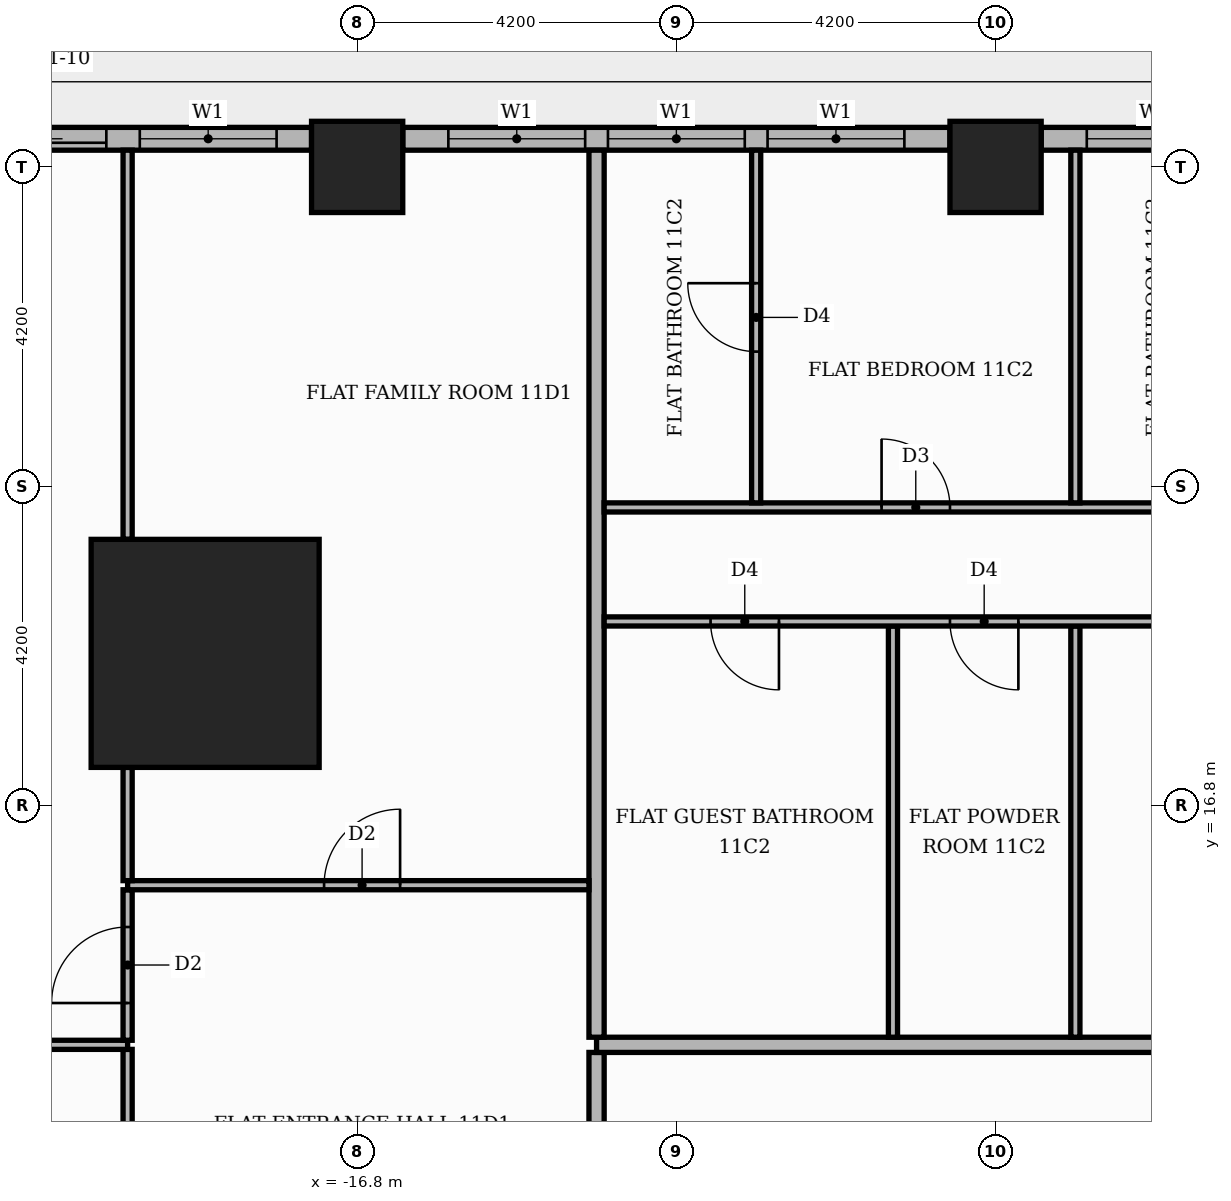
"""IFC4 building model, lengths in metres.
Left out: names, types, materials, properties, quantities, classifications, styles, units other than length and angle.
Written with IfcOpenShell. Run it as: python <this file> out.ifc"""

import sys

from ifc_helpers import new_model, si_unit, direction, frame, frame_2d, origin, origin_2d, place, context, subcontext, project, spatial, rectangle, extrude, element, fill, save


model = new_model("IFC4")
c1 = context("Model", 3, precision=1e-05, world=origin(), true_north=direction((0.0, 1.0)))
c2 = subcontext(c1, "Body", "Model", "MODEL_VIEW")
j1 = project(units=[si_unit("LENGTHUNIT", "METRE"), si_unit("PLANEANGLEUNIT", "RADIAN")], contexts=[c1])
p1 = place(None, origin())
s1 = spatial("IfcSite", under=j1, at=p1, CompositionType="ELEMENT")
p2 = place(p1, origin())
s2 = spatial("IfcBuilding", under=s1, at=p2, CompositionType="ELEMENT")
p3 = place(p2, frame((0.0, 0.0, 50.4)))
s3 = spatial("IfcBuildingStorey", under=s2, at=p3, CompositionType="ELEMENT", Elevation=50.4)
p4 = place(p3, frame((-18.8, 18.8, 0.0), z_axis=(0.0, 0.0, 1.0), x_axis=(1.0, 0.0, 0.0)))
e1 = element("IfcColumn", 1, at=p4, inside=s3, PredefinedType="COLUMN", context=c2, shape_type="SweptSolid", body=[
    extrude(rectangle(XDim=3.0, YDim=3.0, at=origin_2d()), origin(), (0.0, 0.0, 1.0), 3.9),
])
for number, where, z_axis, x_axis in (
    (2, (-8.4, 25.2, 0.0), (0.0, 0.0, 1.0), (1.0, 0.0, 0.0)),
    (3, (-16.8, 25.2, 0.0), (0.0, 0.0, 1.0), (1.0, 0.0, 0.0)),
):
    element("IfcColumn", number, at=place(p3, frame(where, z_axis=z_axis, x_axis=x_axis)), inside=s3, PredefinedType="COLUMN", context=c2, shape_type="SweptSolid", body=[
        extrude(rectangle(XDim=1.2, YDim=1.2, at=origin_2d()), origin(), (0.0, 0.0, 1.0), 3.9),
    ])
p5 = place(p3, frame((-0.6, 25.57, 0.0), z_axis=(0.0, 0.0, 1.0), x_axis=(-1.0, 0.0, 0.0)))
e4 = element("IfcWall", 4, at=p5, inside=s3, PredefinedType="STANDARD", context=c2, shape_type="SweptSolid", body=[
    extrude(rectangle(XDim=7.2, YDim=0.3, at=frame_2d((3.6, 0.0))), origin(), (0.0, 0.0, 1.0), 3.48),
])
p6 = place(p5, frame((0.6, 0.0, 0.0)))
e5 = element("IfcOpeningElement", 5, at=p6, cuts=e4, PredefinedType="OPENING", context=c2, shape_type="SweptSolid", body=[
    extrude(rectangle(XDim=1.8, YDim=2.4, at=frame_2d((0.9, 1.2))), frame((0.0, 0.16, 0.0), z_axis=(0.0, -1.0, 0.0), x_axis=(1.0, 0.0, 0.0)), (0.0, 0.0, 1.0), 0.32),
])
p7 = place(p5, frame((2.7, 0.0, 0.9)))
e6 = element("IfcOpeningElement", 6, at=p7, cuts=e4, PredefinedType="OPENING", context=c2, shape_type="SweptSolid", body=[
    extrude(rectangle(XDim=1.8, YDim=2.1, at=frame_2d((0.9, 1.05))), frame((0.0, 0.16, 0.0), z_axis=(0.0, -1.0, 0.0), x_axis=(1.0, 0.0, 0.0)), (0.0, 0.0, 1.0), 0.32),
])
p8 = place(p5, frame((4.8, 0.0, 0.9)))
e7 = element("IfcOpeningElement", 7, at=p8, cuts=e4, PredefinedType="OPENING", context=c2, shape_type="SweptSolid", body=[
    extrude(rectangle(XDim=1.8, YDim=2.1, at=frame_2d((0.9, 1.05))), frame((0.0, 0.16, 0.0), z_axis=(0.0, -1.0, 0.0), x_axis=(1.0, 0.0, 0.0)), (0.0, 0.0, 1.0), 0.32),
])
p9 = place(p3, frame((-9.0, 25.57, 0.0), z_axis=(0.0, 0.0, 1.0), x_axis=(-1.0, 0.0, 0.0)))
e8 = element("IfcWall", 8, at=p9, inside=s3, PredefinedType="STANDARD", context=c2, shape_type="SweptSolid", body=[
    extrude(rectangle(XDim=7.2, YDim=0.3, at=frame_2d((3.6, 0.0))), origin(), (0.0, 0.0, 1.0), 3.48),
])
p10 = place(p9, frame((0.6, 0.0, 0.9)))
e9 = element("IfcOpeningElement", 9, at=p10, cuts=e8, PredefinedType="OPENING", context=c2, shape_type="SweptSolid", body=[
    extrude(rectangle(XDim=1.8, YDim=2.1, at=frame_2d((0.9, 1.05))), frame((0.0, 0.16, 0.0), z_axis=(0.0, -1.0, 0.0), x_axis=(1.0, 0.0, 0.0)), (0.0, 0.0, 1.0), 0.32),
])
p11 = place(p9, frame((2.7, 0.0, 0.9)))
e10 = element("IfcOpeningElement", 10, at=p11, cuts=e8, PredefinedType="OPENING", context=c2, shape_type="SweptSolid", body=[
    extrude(rectangle(XDim=1.8, YDim=2.1, at=frame_2d((0.9, 1.05))), frame((0.0, 0.16, 0.0), z_axis=(0.0, -1.0, 0.0), x_axis=(1.0, 0.0, 0.0)), (0.0, 0.0, 1.0), 0.32),
])
p12 = place(p9, frame((4.8, 0.0, 0.9)))
e11 = element("IfcOpeningElement", 11, at=p12, cuts=e8, PredefinedType="OPENING", context=c2, shape_type="SweptSolid", body=[
    extrude(rectangle(XDim=1.8, YDim=2.1, at=frame_2d((0.9, 1.05))), frame((0.0, 0.16, 0.0), z_axis=(0.0, -1.0, 0.0), x_axis=(1.0, 0.0, 0.0)), (0.0, 0.0, 1.0), 0.32),
])
p13 = place(p3, frame((-17.4, 25.57, 0.0), z_axis=(0.0, 0.0, 1.0), x_axis=(-1.0, 0.0, 0.0)))
e12 = element("IfcWall", 12, at=p13, inside=s3, PredefinedType="STANDARD", context=c2, shape_type="SweptSolid", body=[
    extrude(rectangle(XDim=5.32, YDim=0.3, at=frame_2d((2.66, 0.0))), origin(), (0.0, 0.0, 1.0), 3.48),
])
p14 = place(p13, frame((2.7, 0.0, 0.0)))
e13 = element("IfcOpeningElement", 13, at=p14, cuts=e12, PredefinedType="OPENING", context=c2, shape_type="SweptSolid", body=[
    extrude(rectangle(XDim=1.8, YDim=2.4, at=frame_2d((0.9, 1.2))), frame((0.0, 0.16, 0.0), z_axis=(0.0, -1.0, 0.0), x_axis=(1.0, 0.0, 0.0)), (0.0, 0.0, 1.0), 0.32),
])
p15 = place(p13, frame((0.46, 0.0, 0.9)))
e14 = element("IfcOpeningElement", 14, at=p15, cuts=e12, PredefinedType="OPENING", context=c2, shape_type="SweptSolid", body=[
    extrude(rectangle(XDim=1.8, YDim=2.1, at=frame_2d((0.9, 1.05))), frame((0.0, 0.16, 0.0), z_axis=(0.0, -1.0, 0.0), x_axis=(1.0, 0.0, 0.0)), (0.0, 0.0, 1.0), 0.32),
])
p16 = place(p3, frame((-13.65, 5.35, 0.0), z_axis=(0.0, 0.0, 1.0), x_axis=(0.0, 1.0, 0.0)))
e15 = element("IfcWall", 15, at=p16, inside=s3, PredefinedType="PARTITIONING", context=c2, shape_type="SweptSolid", body=[
    extrude(rectangle(XDim=8.2, YDim=0.2, at=frame_2d((4.1, 0.0))), origin(), (0.0, 0.0, 1.0), 3.48),
])
p17 = place(p16, frame((5.65, 0.0, 0.0)))
e16 = element("IfcOpeningElement", 16, at=p17, cuts=e15, PredefinedType="OPENING", context=c2, shape_type="SweptSolid", body=[
    extrude(rectangle(XDim=1.1, YDim=2.4, at=frame_2d((0.55, 1.2))), frame((0.0, 0.11, 0.0), z_axis=(0.0, -1.0, 0.0), x_axis=(1.0, 0.0, 0.0)), (0.0, 0.0, 1.0), 0.22),
])
p18 = place(p3, frame((-19.82, 9.51, 0.0), z_axis=(0.0, 0.0, 1.0), x_axis=(0.0, 1.0, 0.0)))
e17 = element("IfcWall", 17, at=p18, inside=s3, PredefinedType="PARTITIONING", context=c2, shape_type="SweptSolid", body=[
    extrude(rectangle(XDim=4.08, YDim=0.12, at=frame_2d((2.04, 0.0))), origin(), (0.0, 0.0, 1.0), 3.48),
])
p19 = place(p18, frame((1.59, 0.0, 0.0)))
e18 = element("IfcOpeningElement", 18, at=p19, cuts=e17, PredefinedType="OPENING", context=c2, shape_type="SweptSolid", body=[
    extrude(rectangle(XDim=0.9, YDim=2.1, at=frame_2d((0.45, 1.05))), frame((0.0, 0.07, 0.0), z_axis=(0.0, -1.0, 0.0), x_axis=(1.0, 0.0, 0.0)), (0.0, 0.0, 1.0), 0.14),
])
p20 = place(p3, frame((-25.42, 13.65, 0.0), z_axis=(0.0, 0.0, 1.0), x_axis=(1.0, 0.0, 0.0)))
e19 = element("IfcWall", 19, at=p20, inside=s3, PredefinedType="PARTITIONING", context=c2, shape_type="SweptSolid", body=[
    extrude(rectangle(XDim=5.6, YDim=0.12, at=frame_2d((2.8, 0.0))), origin(), (0.0, 0.0, 1.0), 3.48),
])
p21 = place(p3, frame((-13.65, 13.65, 0.0), z_axis=(0.0, 0.0, 1.0), x_axis=(1.0, 0.0, 0.0)))
e20 = element("IfcWall", 20, at=p21, inside=s3, PredefinedType="PARTITIONING", context=c2, shape_type="SweptSolid", body=[
    extrude(rectangle(XDim=39.07, YDim=0.2, at=frame_2d((19.535, 0.0))), origin(), (0.0, 0.0, 1.0), 3.48),
])
p22 = place(p21, frame((24.65, 0.0, 0.0)))
e21 = element("IfcOpeningElement", 21, at=p22, cuts=e20, PredefinedType="OPENING", context=c2, shape_type="SweptSolid", body=[
    extrude(rectangle(XDim=1.1, YDim=2.4, at=frame_2d((0.55, 1.2))), frame((0.0, 0.11, 0.0), z_axis=(0.0, -1.0, 0.0), x_axis=(1.0, 0.0, 0.0)), (0.0, 0.0, 1.0), 0.22),
])
p23 = place(p21, frame((14.15, 0.0, 0.0)))
e22 = element("IfcOpeningElement", 22, at=p23, cuts=e20, PredefinedType="OPENING", context=c2, shape_type="SweptSolid", body=[
    extrude(rectangle(XDim=1.1, YDim=2.4, at=frame_2d((0.55, 1.2))), frame((0.0, 0.11, 0.0), z_axis=(0.0, -1.0, 0.0), x_axis=(1.0, 0.0, 0.0)), (0.0, 0.0, 1.0), 0.22),
])
p24 = place(p3, frame((-19.82, 13.71, 0.0), z_axis=(0.0, 0.0, 1.0), x_axis=(0.0, 1.0, 0.0)))
e23 = element("IfcWall", 23, at=p24, inside=s3, PredefinedType="PARTITIONING", context=c2, shape_type="SweptSolid", body=[
    extrude(rectangle(XDim=1.98, YDim=0.12, at=frame_2d((0.99, 0.0))), origin(), (0.0, 0.0, 1.0), 3.48),
])
p25 = place(p24, frame((0.49, 0.0, 0.0)))
e24 = element("IfcOpeningElement", 24, at=p25, cuts=e23, PredefinedType="OPENING", context=c2, shape_type="SweptSolid", body=[
    extrude(rectangle(XDim=1.0, YDim=2.1, at=frame_2d((0.5, 1.05))), frame((0.0, 0.07, 0.0), z_axis=(0.0, -1.0, 0.0), x_axis=(1.0, 0.0, 0.0)), (0.0, 0.0, 1.0), 0.14),
])
p26 = place(p3, frame((-13.65, 13.75, 0.0), z_axis=(0.0, 0.0, 1.0), x_axis=(0.0, 1.0, 0.0)))
e25 = element("IfcWall", 25, at=p26, inside=s3, PredefinedType="PARTITIONING", context=c2, shape_type="SweptSolid", body=[
    extrude(rectangle(XDim=11.67, YDim=0.2, at=frame_2d((5.835, 0.0))), origin(), (0.0, 0.0, 1.0), 3.48),
])
for number, where, z_axis, x_axis in (
    (26, (-9.75, 13.75, 0.0), (0.0, 0.0, 1.0), (0.0, 1.0, 0.0)),
    (27, (-7.35, 13.75, 0.0), (0.0, 0.0, 1.0), (0.0, 1.0, 0.0)),
):
    element("IfcWall", number, at=place(p3, frame(where, z_axis=z_axis, x_axis=x_axis)), inside=s3, PredefinedType="PARTITIONING", context=c2, shape_type="SweptSolid", body=[
        extrude(rectangle(XDim=5.41, YDim=0.12, at=frame_2d((2.705, 0.0))), origin(), (0.0, 0.0, 1.0), 3.48),
    ])
p27 = place(p3, frame((-19.82, 15.75, 0.0), z_axis=(0.0, 0.0, 1.0), x_axis=(1.0, 0.0, 0.0)))
e28 = element("IfcWall", 28, at=p27, inside=s3, PredefinedType="PARTITIONING", context=c2, shape_type="SweptSolid", body=[
    extrude(rectangle(XDim=6.07, YDim=0.12, at=frame_2d((3.035, 0.0))), origin(), (0.0, 0.0, 1.0), 3.48),
])
p28 = place(p27, frame((2.585, 0.0, 0.0)))
e29 = element("IfcOpeningElement", 29, at=p28, cuts=e28, PredefinedType="OPENING", context=c2, shape_type="SweptSolid", body=[
    extrude(rectangle(XDim=1.0, YDim=2.1, at=frame_2d((0.5, 1.05))), frame((0.0, 0.07, 0.0), z_axis=(0.0, -1.0, 0.0), x_axis=(1.0, 0.0, 0.0)), (0.0, 0.0, 1.0), 0.14),
])
p29 = place(p3, frame((-19.82, 15.81, 0.0), z_axis=(0.0, 0.0, 1.0), x_axis=(0.0, 1.0, 0.0)))
e30 = element("IfcWall", 30, at=p29, inside=s3, PredefinedType="PARTITIONING", context=c2, shape_type="SweptSolid", body=[
    extrude(rectangle(XDim=1.49, YDim=0.12, at=frame_2d((0.745, 0.0))), origin(), (0.0, 0.0, 1.0), 3.48),
])
p30 = place(p3, frame((-13.55, 19.22, 0.0), z_axis=(0.0, 0.0, 1.0), x_axis=(1.0, 0.0, 0.0)))
e31 = element("IfcWall", 31, at=p30, inside=s3, PredefinedType="PARTITIONING", context=c2, shape_type="SweptSolid", body=[
    extrude(rectangle(XDim=12.5, YDim=0.12, at=frame_2d((6.25, 0.0))), origin(), (0.0, 0.0, 1.0), 3.48),
])
p31 = place(p30, frame((8.9, 0.0, 0.0)))
e32 = element("IfcOpeningElement", 32, at=p31, cuts=e31, PredefinedType="OPENING", context=c2, shape_type="SweptSolid", body=[
    extrude(rectangle(XDim=0.9, YDim=2.1, at=frame_2d((0.45, 1.05))), frame((0.0, 0.07, 0.0), z_axis=(0.0, -1.0, 0.0), x_axis=(1.0, 0.0, 0.0)), (0.0, 0.0, 1.0), 0.14),
])
p32 = place(p30, frame((4.55, 0.0, 0.0)))
e33 = element("IfcOpeningElement", 33, at=p32, cuts=e31, PredefinedType="OPENING", context=c2, shape_type="SweptSolid", body=[
    extrude(rectangle(XDim=0.9, YDim=2.1, at=frame_2d((0.45, 1.05))), frame((0.0, 0.07, 0.0), z_axis=(0.0, -1.0, 0.0), x_axis=(1.0, 0.0, 0.0)), (0.0, 0.0, 1.0), 0.14),
])
p33 = place(p30, frame((1.4, 0.0, 0.0)))
e34 = element("IfcOpeningElement", 34, at=p33, cuts=e31, PredefinedType="OPENING", context=c2, shape_type="SweptSolid", body=[
    extrude(rectangle(XDim=0.9, YDim=2.1, at=frame_2d((0.45, 1.05))), frame((0.0, 0.07, 0.0), z_axis=(0.0, -1.0, 0.0), x_axis=(1.0, 0.0, 0.0)), (0.0, 0.0, 1.0), 0.14),
])
p34 = place(p3, frame((-19.82, 20.3, 0.0), z_axis=(0.0, 0.0, 1.0), x_axis=(0.0, 1.0, 0.0)))
e35 = element("IfcWall", 35, at=p34, inside=s3, PredefinedType="PARTITIONING", context=c2, shape_type="SweptSolid", body=[
    extrude(rectangle(XDim=5.12, YDim=0.12, at=frame_2d((2.56, 0.0))), origin(), (0.0, 0.0, 1.0), 3.48),
])
p35 = place(p3, frame((-13.55, 20.72, 0.0), z_axis=(0.0, 0.0, 1.0), x_axis=(1.0, 0.0, 0.0)))
e36 = element("IfcWall", 36, at=p35, inside=s3, PredefinedType="PARTITIONING", context=c2, shape_type="SweptSolid", body=[
    extrude(rectangle(XDim=18.7, YDim=0.12, at=frame_2d((9.35, 0.0))), origin(), (0.0, 0.0, 1.0), 3.48),
])
p36 = place(p35, frame((16.2, 0.0, 0.0)))
e37 = element("IfcOpeningElement", 37, at=p36, cuts=e36, PredefinedType="OPENING", context=c2, shape_type="SweptSolid", body=[
    extrude(rectangle(XDim=1.0, YDim=2.1, at=frame_2d((0.5, 1.05))), frame((0.0, 0.07, 0.0), z_axis=(0.0, -1.0, 0.0), x_axis=(1.0, 0.0, 0.0)), (0.0, 0.0, 1.0), 0.14),
])
p37 = place(p35, frame((12.05, 0.0, 0.0)))
e38 = element("IfcOpeningElement", 38, at=p37, cuts=e36, PredefinedType="OPENING", context=c2, shape_type="SweptSolid", body=[
    extrude(rectangle(XDim=0.9, YDim=2.1, at=frame_2d((0.45, 1.05))), frame((0.0, 0.07, 0.0), z_axis=(0.0, -1.0, 0.0), x_axis=(1.0, 0.0, 0.0)), (0.0, 0.0, 1.0), 0.14),
])
p38 = place(p35, frame((3.65, 0.0, 0.0)))
e39 = element("IfcOpeningElement", 39, at=p38, cuts=e36, PredefinedType="OPENING", context=c2, shape_type="SweptSolid", body=[
    extrude(rectangle(XDim=0.9, YDim=2.1, at=frame_2d((0.45, 1.05))), frame((0.0, 0.07, 0.0), z_axis=(0.0, -1.0, 0.0), x_axis=(1.0, 0.0, 0.0)), (0.0, 0.0, 1.0), 0.14),
])
p39 = place(p3, frame((-11.55, 20.78, 0.0), z_axis=(0.0, 0.0, 1.0), x_axis=(0.0, 1.0, 0.0)))
e40 = element("IfcWall", 40, at=p39, inside=s3, PredefinedType="PARTITIONING", context=c2, shape_type="SweptSolid", body=[
    extrude(rectangle(XDim=4.64, YDim=0.12, at=frame_2d((2.32, 0.0))), origin(), (0.0, 0.0, 1.0), 3.48),
])
p40 = place(p39, frame((1.99, 0.0, 0.0)))
e41 = element("IfcOpeningElement", 41, at=p40, cuts=e40, PredefinedType="OPENING", context=c2, shape_type="SweptSolid", body=[
    extrude(rectangle(XDim=0.9, YDim=2.1, at=frame_2d((0.45, 1.05))), frame((0.0, 0.07, 0.0), z_axis=(0.0, -1.0, 0.0), x_axis=(1.0, 0.0, 0.0)), (0.0, 0.0, 1.0), 0.14),
])
p41 = place(p3, frame((-7.35, 20.78, 0.0), z_axis=(0.0, 0.0, 1.0), x_axis=(0.0, 1.0, 0.0)))
e42 = element("IfcWall", 42, at=p41, inside=s3, PredefinedType="PARTITIONING", context=c2, shape_type="SweptSolid", body=[
    extrude(rectangle(XDim=4.64, YDim=0.12, at=frame_2d((2.32, 0.0))), origin(), (0.0, 0.0, 1.0), 3.48),
])
p42 = place(p8, origin())
e43 = element("IfcWindow", 43, at=p42, inside=s3, PartitioningType="SINGLE_PANEL", PredefinedType="WINDOW", context=c2, shape_type="SweptSolid", body=[
    extrude(rectangle(XDim=1.8, YDim=2.1, at=frame_2d((0.9, 1.05))), frame((0.0, 0.03, 0.0), z_axis=(0.0, -1.0, 0.0), x_axis=(1.0, 0.0, 0.0)), (0.0, 0.0, 1.0), 0.06),
])
fill(e7, e43)
p43 = place(p10, origin())
e44 = element("IfcWindow", 44, at=p43, inside=s3, PartitioningType="SINGLE_PANEL", PredefinedType="WINDOW", context=c2, shape_type="SweptSolid", body=[
    extrude(rectangle(XDim=1.8, YDim=2.1, at=frame_2d((0.9, 1.05))), frame((0.0, 0.03, 0.0), z_axis=(0.0, -1.0, 0.0), x_axis=(1.0, 0.0, 0.0)), (0.0, 0.0, 1.0), 0.06),
])
fill(e9, e44)
p44 = place(p11, origin())
e45 = element("IfcWindow", 45, at=p44, inside=s3, PartitioningType="SINGLE_PANEL", PredefinedType="WINDOW", context=c2, shape_type="SweptSolid", body=[
    extrude(rectangle(XDim=1.8, YDim=2.1, at=frame_2d((0.9, 1.05))), frame((0.0, 0.03, 0.0), z_axis=(0.0, -1.0, 0.0), x_axis=(1.0, 0.0, 0.0)), (0.0, 0.0, 1.0), 0.06),
])
fill(e10, e45)
p45 = place(p12, origin())
e46 = element("IfcWindow", 46, at=p45, inside=s3, PartitioningType="SINGLE_PANEL", PredefinedType="WINDOW", context=c2, shape_type="SweptSolid", body=[
    extrude(rectangle(XDim=1.8, YDim=2.1, at=frame_2d((0.9, 1.05))), frame((0.0, 0.03, 0.0), z_axis=(0.0, -1.0, 0.0), x_axis=(1.0, 0.0, 0.0)), (0.0, 0.0, 1.0), 0.06),
])
fill(e11, e46)
p46 = place(p14, origin())
e47 = element("IfcDoor", 47, at=p46, inside=s3, OperationType="SLIDING_TO_LEFT", PredefinedType="DOOR", context=c2, shape_type="SweptSolid", body=[
    extrude(rectangle(XDim=1.8, YDim=2.4, at=frame_2d((0.9, 1.2))), frame((0.0, 0.025, 0.0), z_axis=(0.0, -1.0, 0.0), x_axis=(1.0, 0.0, 0.0)), (0.0, 0.0, 1.0), 0.05),
])
fill(e13, e47)
p47 = place(p15, origin())
e48 = element("IfcWindow", 48, at=p47, inside=s3, PartitioningType="SINGLE_PANEL", PredefinedType="WINDOW", context=c2, shape_type="SweptSolid", body=[
    extrude(rectangle(XDim=1.8, YDim=2.1, at=frame_2d((0.9, 1.05))), frame((0.0, 0.03, 0.0), z_axis=(0.0, -1.0, 0.0), x_axis=(1.0, 0.0, 0.0)), (0.0, 0.0, 1.0), 0.06),
])
fill(e14, e48)
p48 = place(p32, frame((0.9, 0.0, 0.0), z_axis=(0.0, 0.0, 1.0), x_axis=(-1.0, 0.0, 0.0)))
e49 = element("IfcDoor", 49, at=p48, inside=s3, OperationType="SINGLE_SWING_RIGHT", PredefinedType="DOOR", context=c2, shape_type="SweptSolid", body=[
    extrude(rectangle(XDim=0.9, YDim=2.1, at=frame_2d((0.45, 1.05))), frame((0.0, 0.025, 0.0), z_axis=(0.0, -1.0, 0.0), x_axis=(1.0, 0.0, 0.0)), (0.0, 0.0, 1.0), 0.05),
])
fill(e33, e49)
p49 = place(p33, frame((0.9, 0.0, 0.0), z_axis=(0.0, 0.0, 1.0), x_axis=(-1.0, 0.0, 0.0)))
e50 = element("IfcDoor", 50, at=p49, inside=s3, OperationType="SINGLE_SWING_RIGHT", PredefinedType="DOOR", context=c2, shape_type="SweptSolid", body=[
    extrude(rectangle(XDim=0.9, YDim=2.1, at=frame_2d((0.45, 1.05))), frame((0.0, 0.025, 0.0), z_axis=(0.0, -1.0, 0.0), x_axis=(1.0, 0.0, 0.0)), (0.0, 0.0, 1.0), 0.05),
])
fill(e34, e50)
p50 = place(p38, origin())
e51 = element("IfcDoor", 51, at=p50, inside=s3, OperationType="SINGLE_SWING_LEFT", PredefinedType="DOOR", context=c2, shape_type="SweptSolid", body=[
    extrude(rectangle(XDim=0.9, YDim=2.1, at=frame_2d((0.45, 1.05))), frame((0.0, 0.025, 0.0), z_axis=(0.0, -1.0, 0.0), x_axis=(1.0, 0.0, 0.0)), (0.0, 0.0, 1.0), 0.05),
])
fill(e39, e51)
p51 = place(p40, origin())
e52 = element("IfcDoor", 52, at=p51, inside=s3, OperationType="SINGLE_SWING_RIGHT", PredefinedType="DOOR", context=c2, shape_type="SweptSolid", body=[
    extrude(rectangle(XDim=0.9, YDim=2.1, at=frame_2d((0.45, 1.05))), frame((0.0, 0.025, 0.0), z_axis=(0.0, -1.0, 0.0), x_axis=(1.0, 0.0, 0.0)), (0.0, 0.0, 1.0), 0.05),
])
fill(e41, e52)
p52 = place(p28, origin())
e53 = element("IfcDoor", 53, at=p52, inside=s3, OperationType="SINGLE_SWING_RIGHT", PredefinedType="DOOR", context=c2, shape_type="SweptSolid", body=[
    extrude(rectangle(XDim=1.0, YDim=2.1, at=frame_2d((0.5, 1.05))), frame((0.0, 0.025, 0.0), z_axis=(0.0, -1.0, 0.0), x_axis=(1.0, 0.0, 0.0)), (0.0, 0.0, 1.0), 0.05),
])
fill(e29, e53)
p53 = place(p25, origin())
e54 = element("IfcDoor", 54, at=p53, inside=s3, OperationType="SINGLE_SWING_LEFT", PredefinedType="DOOR", context=c2, shape_type="SweptSolid", body=[
    extrude(rectangle(XDim=1.0, YDim=2.1, at=frame_2d((0.5, 1.05))), frame((0.0, 0.025, 0.0), z_axis=(0.0, -1.0, 0.0), x_axis=(1.0, 0.0, 0.0)), (0.0, 0.0, 1.0), 0.05),
])
fill(e24, e54)
save(model, sys.argv[1])
